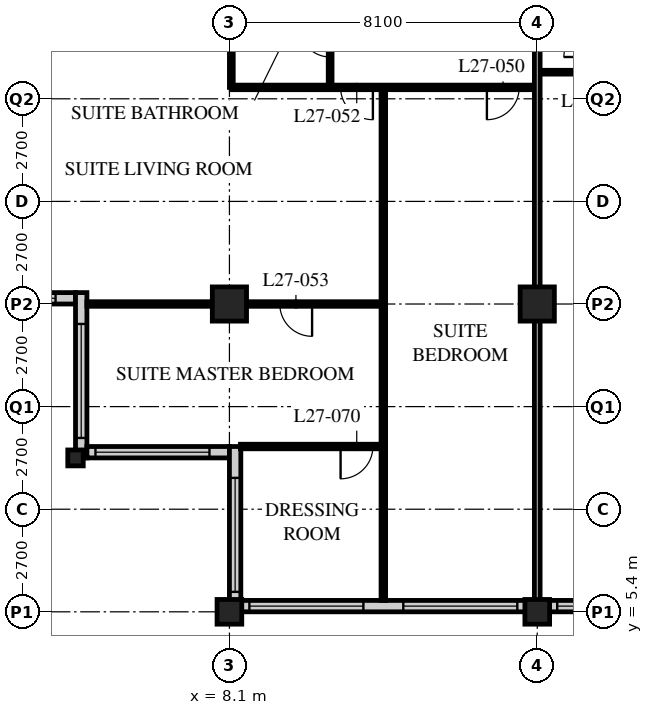
"""IFC4 building model, lengths in metres.
Left out: names, types, materials, properties, quantities, classifications, styles, units other than length and angle.
Written with IfcOpenShell. Run it as: python <this file> out.ifc"""

import sys

from ifc_helpers import new_model, si_unit, direction, frame, frame_2d, origin, origin_2d, place, context, subcontext, project, spatial, rectangle, hollow_rectangle, i_section, extrude, element, fill, save


model = new_model("IFC4")
c1 = context("Model", 3, precision=1e-05, world=origin(), true_north=direction((0.0, 1.0)))
c2 = subcontext(c1, "Body", "Model", "MODEL_VIEW")
j1 = project(units=[si_unit("LENGTHUNIT", "METRE"), si_unit("PLANEANGLEUNIT", "RADIAN")], contexts=[c1])
p1 = place(None, origin())
s1 = spatial("IfcSite", under=j1, at=p1, CompositionType="ELEMENT")
p2 = place(p1, origin())
s2 = spatial("IfcBuilding", under=s1, at=p2, CompositionType="ELEMENT")
p3 = place(p2, frame((0.0, 0.0, 110.2)))
s3 = spatial("IfcBuildingStorey", under=s2, at=p3, CompositionType="ELEMENT", Elevation=110.2)
p4 = place(p3, frame((4.05, 9.45, 0.0), z_axis=(0.0, 0.0, 1.0), x_axis=(1.0, 0.0, 0.0)))
e1 = element("IfcColumn", 1, at=p4, inside=s3, PredefinedType="COLUMN", context=c2, shape_type="SweptSolid", body=[
    extrude(i_section(OverallWidth=0.407, OverallDepth=0.419, WebThickness=0.031, FlangeThickness=0.049, FilletRadius=0.015, at=origin_2d()), origin(), (0.0, 0.0, 1.0), 3.4),
])
p5 = place(p3, frame((8.1, 5.4, 0.0), z_axis=(0.0, 0.0, 1.0), x_axis=(1.0, 0.0, 0.0)))
e2 = element("IfcColumn", 2, at=p5, inside=s3, PredefinedType="COLUMN", context=c2, shape_type="SweptSolid", body=[
    extrude(hollow_rectangle(XDim=0.65, YDim=0.65, WallThickness=0.055, at=origin_2d()), origin(), (0.0, 0.0, 1.0), 3.4),
])
p6 = place(p3, frame((8.1, 13.5, 0.0), z_axis=(0.0, 0.0, 1.0), x_axis=(1.0, 0.0, 0.0)))
e3 = element("IfcColumn", 3, at=p6, inside=s3, PredefinedType="COLUMN", context=c2, shape_type="SweptSolid", body=[
    extrude(hollow_rectangle(XDim=0.9, YDim=0.9, WallThickness=0.09, at=origin_2d()), origin(), (0.0, 0.0, 1.0), 3.4),
])
p7 = place(p3, frame((16.2, 5.4, 0.0), z_axis=(0.0, 0.0, 1.0), x_axis=(1.0, 0.0, 0.0)))
e4 = element("IfcColumn", 4, at=p7, inside=s3, PredefinedType="COLUMN", context=c2, shape_type="SweptSolid", body=[
    extrude(hollow_rectangle(XDim=0.65, YDim=0.65, WallThickness=0.055, at=origin_2d()), origin(), (0.0, 0.0, 1.0), 3.4),
])
p8 = place(p3, frame((16.2, 13.5, 0.0), z_axis=(0.0, 0.0, 1.0), x_axis=(1.0, 0.0, 0.0)))
e5 = element("IfcColumn", 5, at=p8, inside=s3, PredefinedType="COLUMN", context=c2, shape_type="SweptSolid", body=[
    extrude(hollow_rectangle(XDim=0.9, YDim=0.9, WallThickness=0.09, at=origin_2d()), origin(), (0.0, 0.0, 1.0), 3.4),
])
p9 = place(p3, frame((8.4, 5.55, 0.0), z_axis=(0.0, 0.0, 1.0), x_axis=(1.0, 0.0, 0.0)))
e6 = element("IfcWall", 6, at=p9, inside=s3, PredefinedType="SOLIDWALL", context=c2, shape_type="SweptSolid", body=[
    extrude(rectangle(XDim=40.2, YDim=0.3, at=frame_2d((20.1, 0.0))), origin(), (0.0, 0.0, 1.0), 3.19),
])
p10 = place(p9, frame((0.225, 0.0, 0.9)))
e7 = element("IfcOpeningElement", 7, at=p10, cuts=e6, PredefinedType="OPENING", context=c2, shape_type="SweptSolid", body=[
    extrude(rectangle(XDim=3.0, YDim=2.0, at=frame_2d((1.5, 1.0))), frame((0.0, 0.16, 0.0), z_axis=(0.0, -1.0, 0.0), x_axis=(1.0, 0.0, 0.0)), (0.0, 0.0, 1.0), 0.32),
])
p11 = place(p9, frame((4.275, 0.0, 0.9)))
e8 = element("IfcOpeningElement", 8, at=p11, cuts=e6, PredefinedType="OPENING", context=c2, shape_type="SweptSolid", body=[
    extrude(rectangle(XDim=3.0, YDim=2.0, at=frame_2d((1.5, 1.0))), frame((0.0, 0.16, 0.0), z_axis=(0.0, -1.0, 0.0), x_axis=(1.0, 0.0, 0.0)), (0.0, 0.0, 1.0), 0.32),
])
p12 = place(p9, frame((8.325, 0.0, 0.9)))
e9 = element("IfcOpeningElement", 9, at=p12, cuts=e6, PredefinedType="OPENING", context=c2, shape_type="SweptSolid", body=[
    extrude(rectangle(XDim=3.0, YDim=2.0, at=frame_2d((1.5, 1.0))), frame((0.0, 0.16, 0.0), z_axis=(0.0, -1.0, 0.0), x_axis=(1.0, 0.0, 0.0)), (0.0, 0.0, 1.0), 0.32),
])
p13 = place(p9, frame((12.375, 0.0, 0.9)))
e10 = element("IfcOpeningElement", 10, at=p13, cuts=e6, PredefinedType="OPENING", context=c2, shape_type="SweptSolid", body=[
    extrude(rectangle(XDim=3.0, YDim=2.0, at=frame_2d((1.5, 1.0))), frame((0.0, 0.16, 0.0), z_axis=(0.0, -1.0, 0.0), x_axis=(1.0, 0.0, 0.0)), (0.0, 0.0, 1.0), 0.32),
])
p14 = place(p9, frame((16.425, 0.0, 0.9)))
e11 = element("IfcOpeningElement", 11, at=p14, cuts=e6, PredefinedType="OPENING", context=c2, shape_type="SweptSolid", body=[
    extrude(rectangle(XDim=3.0, YDim=2.0, at=frame_2d((1.5, 1.0))), frame((0.0, 0.16, 0.0), z_axis=(0.0, -1.0, 0.0), x_axis=(1.0, 0.0, 0.0)), (0.0, 0.0, 1.0), 0.32),
])
p15 = place(p9, frame((20.475, 0.0, 0.9)))
e12 = element("IfcOpeningElement", 12, at=p15, cuts=e6, PredefinedType="OPENING", context=c2, shape_type="SweptSolid", body=[
    extrude(rectangle(XDim=3.0, YDim=2.0, at=frame_2d((1.5, 1.0))), frame((0.0, 0.16, 0.0), z_axis=(0.0, -1.0, 0.0), x_axis=(1.0, 0.0, 0.0)), (0.0, 0.0, 1.0), 0.32),
])
p16 = place(p9, frame((24.525, 0.0, 0.9)))
e13 = element("IfcOpeningElement", 13, at=p16, cuts=e6, PredefinedType="OPENING", context=c2, shape_type="SweptSolid", body=[
    extrude(rectangle(XDim=3.0, YDim=2.0, at=frame_2d((1.5, 1.0))), frame((0.0, 0.16, 0.0), z_axis=(0.0, -1.0, 0.0), x_axis=(1.0, 0.0, 0.0)), (0.0, 0.0, 1.0), 0.32),
])
p17 = place(p9, frame((28.575, 0.0, 0.9)))
e14 = element("IfcOpeningElement", 14, at=p17, cuts=e6, PredefinedType="OPENING", context=c2, shape_type="SweptSolid", body=[
    extrude(rectangle(XDim=3.0, YDim=2.0, at=frame_2d((1.5, 1.0))), frame((0.0, 0.16, 0.0), z_axis=(0.0, -1.0, 0.0), x_axis=(1.0, 0.0, 0.0)), (0.0, 0.0, 1.0), 0.32),
])
p18 = place(p9, frame((32.625, 0.0, 0.9)))
e15 = element("IfcOpeningElement", 15, at=p18, cuts=e6, PredefinedType="OPENING", context=c2, shape_type="SweptSolid", body=[
    extrude(rectangle(XDim=3.0, YDim=2.0, at=frame_2d((1.5, 1.0))), frame((0.0, 0.16, 0.0), z_axis=(0.0, -1.0, 0.0), x_axis=(1.0, 0.0, 0.0)), (0.0, 0.0, 1.0), 0.32),
])
p19 = place(p9, frame((36.675, 0.0, 0.9)))
e16 = element("IfcOpeningElement", 16, at=p19, cuts=e6, PredefinedType="OPENING", context=c2, shape_type="SweptSolid", body=[
    extrude(rectangle(XDim=3.0, YDim=2.0, at=frame_2d((1.5, 1.0))), frame((0.0, 0.16, 0.0), z_axis=(0.0, -1.0, 0.0), x_axis=(1.0, 0.0, 0.0)), (0.0, 0.0, 1.0), 0.32),
])
p20 = place(p3, frame((0.3, 13.65, 0.0), z_axis=(0.0, 0.0, 1.0), x_axis=(1.0, 0.0, 0.0)))
e17 = element("IfcWall", 17, at=p20, inside=s3, PredefinedType="SOLIDWALL", context=c2, shape_type="SweptSolid", body=[
    extrude(rectangle(XDim=3.75, YDim=0.3, at=frame_2d((1.875, 0.0))), origin(), (0.0, 0.0, 1.0), 3.19),
])
p21 = place(p20, frame((0.225, 0.0, 0.9)))
e18 = element("IfcOpeningElement", 18, at=p21, cuts=e17, PredefinedType="OPENING", context=c2, shape_type="SweptSolid", body=[
    extrude(rectangle(XDim=3.0, YDim=1.5, at=frame_2d((1.5, 0.75))), frame((0.0, 0.16, 0.0), z_axis=(0.0, -1.0, 0.0), x_axis=(1.0, 0.0, 0.0)), (0.0, 0.0, 1.0), 0.32),
])
p22 = place(p3, frame((4.2, 13.8, 0.0), z_axis=(0.0, 0.0, 1.0), x_axis=(0.0, -1.0, 0.0)))
e19 = element("IfcWall", 19, at=p22, inside=s3, PredefinedType="SOLIDWALL", context=c2, shape_type="SweptSolid", body=[
    extrude(rectangle(XDim=4.35, YDim=0.3, at=frame_2d((2.175, 0.0))), origin(), (0.0, 0.0, 1.0), 3.19),
])
p23 = place(p22, frame((0.825, 0.0, 0.9)))
e20 = element("IfcOpeningElement", 20, at=p23, cuts=e19, PredefinedType="OPENING", context=c2, shape_type="SweptSolid", body=[
    extrude(rectangle(XDim=3.0, YDim=1.5, at=frame_2d((1.5, 0.75))), frame((0.0, 0.16, 0.0), z_axis=(0.0, -1.0, 0.0), x_axis=(1.0, 0.0, 0.0)), (0.0, 0.0, 1.0), 0.32),
])
p24 = place(p3, frame((4.35, 9.6, 0.0), z_axis=(0.0, 0.0, 1.0), x_axis=(1.0, 0.0, 0.0)))
e21 = element("IfcWall", 21, at=p24, inside=s3, PredefinedType="SOLIDWALL", context=c2, shape_type="SweptSolid", body=[
    extrude(rectangle(XDim=3.75, YDim=0.3, at=frame_2d((1.875, 0.0))), origin(), (0.0, 0.0, 1.0), 3.19),
])
p25 = place(p24, frame((0.225, 0.0, 0.9)))
e22 = element("IfcOpeningElement", 22, at=p25, cuts=e21, PredefinedType="OPENING", context=c2, shape_type="SweptSolid", body=[
    extrude(rectangle(XDim=3.0, YDim=1.5, at=frame_2d((1.5, 0.75))), frame((0.0, 0.16, 0.0), z_axis=(0.0, -1.0, 0.0), x_axis=(1.0, 0.0, 0.0)), (0.0, 0.0, 1.0), 0.32),
])
p26 = place(p3, frame((8.25, 9.75, 0.0), z_axis=(0.0, 0.0, 1.0), x_axis=(0.0, -1.0, 0.0)))
e23 = element("IfcWall", 23, at=p26, inside=s3, PredefinedType="SOLIDWALL", context=c2, shape_type="SweptSolid", body=[
    extrude(rectangle(XDim=4.35, YDim=0.3, at=frame_2d((2.175, 0.0))), origin(), (0.0, 0.0, 1.0), 3.19),
])
p27 = place(p26, frame((0.825, 0.0, 0.9)))
e24 = element("IfcOpeningElement", 24, at=p27, cuts=e23, PredefinedType="OPENING", context=c2, shape_type="SweptSolid", body=[
    extrude(rectangle(XDim=3.0, YDim=1.5, at=frame_2d((1.5, 0.75))), frame((0.0, 0.16, 0.0), z_axis=(0.0, -1.0, 0.0), x_axis=(1.0, 0.0, 0.0)), (0.0, 0.0, 1.0), 0.32),
])
p28 = place(p3, frame((16.2, 19.6, 0.0), z_axis=(0.0, 0.0, 1.0), x_axis=(1.0, 0.0, 0.0)))
e25 = element("IfcWall", 25, at=p28, inside=s3, PredefinedType="PARTITIONING", context=c2, shape_type="SweptSolid", body=[
    extrude(rectangle(XDim=1.5, YDim=0.1, at=frame_2d((0.75, 0.0))), origin(), (0.0, 0.0, 1.0), 3.19),
])
p29 = place(p3, frame((10.75, 21.6, 0.0), z_axis=(0.0, 0.0, 1.0), x_axis=(0.0, -1.0, 0.0)))
e26 = element("IfcWall", 26, at=p29, inside=s3, PredefinedType="PARTITIONING", context=c2, shape_type="SweptSolid", body=[
    extrude(rectangle(XDim=2.4, YDim=0.1, at=frame_2d((1.2, 0.0))), origin(), (0.0, 0.0, 1.0), 3.19),
])
p30 = place(p29, frame((0.8, 0.0, 0.0)))
e27 = element("IfcOpeningElement", 27, at=p30, cuts=e26, PredefinedType="OPENING", context=c2, shape_type="SweptSolid", body=[
    extrude(rectangle(XDim=0.8, YDim=2.1, at=frame_2d((0.4, 1.05))), frame((0.0, 0.06, 0.0), z_axis=(0.0, -1.0, 0.0), x_axis=(1.0, 0.0, 0.0)), (0.0, 0.0, 1.0), 0.12),
])
p31 = place(p3, frame((8.15, 21.6, 0.0), z_axis=(0.0, 0.0, 1.0), x_axis=(0.0, -1.0, 0.0)))
e28 = element("IfcWall", 28, at=p31, inside=s3, PredefinedType="PARTITIONING", context=c2, shape_type="SweptSolid", body=[
    extrude(rectangle(XDim=2.4, YDim=0.1, at=frame_2d((1.2, 0.0))), origin(), (0.0, 0.0, 1.0), 2.578),
])
p32 = place(p3, frame((8.15, 19.2, 0.0), z_axis=(0.0, 0.0, 1.0), x_axis=(1.0, 0.0, 0.0)))
e29 = element("IfcWall", 29, at=p32, inside=s3, PredefinedType="PARTITIONING", context=c2, shape_type="SweptSolid", body=[
    extrude(rectangle(XDim=8.05, YDim=0.12, at=frame_2d((4.025, 0.0))), origin(), (0.0, 0.0, 1.0), 3.19),
])
p33 = place(p32, frame((6.725, 0.0, 0.0)))
e30 = element("IfcOpeningElement", 30, at=p33, cuts=e29, PredefinedType="OPENING", context=c2, shape_type="SweptSolid", body=[
    extrude(rectangle(XDim=0.85, YDim=2.1, at=frame_2d((0.425, 1.05))), frame((0.0, 0.07, 0.0), z_axis=(0.0, -1.0, 0.0), x_axis=(1.0, 0.0, 0.0)), (0.0, 0.0, 1.0), 0.14),
])
p34 = place(p32, frame((2.875, 0.0, 0.0)))
e31 = element("IfcOpeningElement", 31, at=p34, cuts=e29, PredefinedType="OPENING", context=c2, shape_type="SweptSolid", body=[
    extrude(rectangle(XDim=0.85, YDim=2.1, at=frame_2d((0.425, 1.05))), frame((0.0, 0.07, 0.0), z_axis=(0.0, -1.0, 0.0), x_axis=(1.0, 0.0, 0.0)), (0.0, 0.0, 1.0), 0.14),
])
p35 = place(p3, frame((12.15, 19.2, 0.0), z_axis=(0.0, 0.0, 1.0), x_axis=(0.0, -1.0, 0.0)))
e32 = element("IfcWall", 32, at=p35, inside=s3, PredefinedType="PARTITIONING", context=c2, shape_type="SweptSolid", body=[
    extrude(rectangle(XDim=13.5, YDim=0.12, at=frame_2d((6.75, 0.0))), origin(), (0.0, 0.0, 1.0), 3.19),
])
p36 = place(p3, frame((12.15, 13.5, 0.0), z_axis=(0.0, 0.0, 1.0), x_axis=(-1.0, 0.0, 0.0)))
e33 = element("IfcWall", 33, at=p36, inside=s3, PredefinedType="PARTITIONING", context=c2, shape_type="SweptSolid", body=[
    extrude(rectangle(XDim=7.8, YDim=0.12, at=frame_2d((3.9, 0.0))), origin(), (0.0, 0.0, 1.0), 2.578),
])
p37 = place(p36, frame((1.875, 0.0, 0.0)))
e34 = element("IfcOpeningElement", 34, at=p37, cuts=e33, PredefinedType="OPENING", context=c2, shape_type="SweptSolid", body=[
    extrude(rectangle(XDim=0.85, YDim=2.1, at=frame_2d((0.425, 1.05))), frame((0.0, 0.07, 0.0), z_axis=(0.0, -1.0, 0.0), x_axis=(1.0, 0.0, 0.0)), (0.0, 0.0, 1.0), 0.14),
])
p38 = place(p3, frame((16.2, 21.6, 0.0), z_axis=(0.0, 0.0, 1.0), x_axis=(0.0, -1.0, 0.0)))
e35 = element("IfcWall", 35, at=p38, inside=s3, PredefinedType="PARTITIONING", context=c2, shape_type="SweptSolid", body=[
    extrude(rectangle(XDim=15.9, YDim=0.15, at=frame_2d((7.95, 0.0))), origin(), (0.0, 0.0, 1.0), 2.578),
])
p39 = place(p3, frame((8.39, 9.75, 0.0), z_axis=(0.0, 0.0, 1.0), x_axis=(1.0, 0.0, 0.0)))
e36 = element("IfcWall", 36, at=p39, inside=s3, PredefinedType="PARTITIONING", context=c2, shape_type="SweptSolid", body=[
    extrude(rectangle(XDim=3.76, YDim=0.12, at=frame_2d((1.88, 0.0))), origin(), (0.0, 0.0, 1.0), 3.19),
])
p40 = place(p39, frame((2.635, 0.0, 0.0)))
e37 = element("IfcOpeningElement", 37, at=p40, cuts=e36, PredefinedType="OPENING", context=c2, shape_type="SweptSolid", body=[
    extrude(rectangle(XDim=0.85, YDim=2.1, at=frame_2d((0.425, 1.05))), frame((0.0, 0.07, 0.0), z_axis=(0.0, -1.0, 0.0), x_axis=(1.0, 0.0, 0.0)), (0.0, 0.0, 1.0), 0.14),
])
p41 = place(p10, origin())
e38 = element("IfcWindow", 38, at=p41, inside=s3, PartitioningType="SINGLE_PANEL", PredefinedType="WINDOW", context=c2, shape_type="SweptSolid", body=[
    extrude(rectangle(XDim=3.0, YDim=2.0, at=frame_2d((1.5, 1.0))), frame((0.0, 0.03, 0.0), z_axis=(0.0, -1.0, 0.0), x_axis=(1.0, 0.0, 0.0)), (0.0, 0.0, 1.0), 0.06),
])
fill(e7, e38)
p42 = place(p11, origin())
e39 = element("IfcWindow", 39, at=p42, inside=s3, PartitioningType="SINGLE_PANEL", PredefinedType="WINDOW", context=c2, shape_type="SweptSolid", body=[
    extrude(rectangle(XDim=3.0, YDim=2.0, at=frame_2d((1.5, 1.0))), frame((0.0, 0.03, 0.0), z_axis=(0.0, -1.0, 0.0), x_axis=(1.0, 0.0, 0.0)), (0.0, 0.0, 1.0), 0.06),
])
fill(e8, e39)
p43 = place(p12, origin())
e40 = element("IfcWindow", 40, at=p43, inside=s3, PartitioningType="SINGLE_PANEL", PredefinedType="WINDOW", context=c2, shape_type="SweptSolid", body=[
    extrude(rectangle(XDim=3.0, YDim=2.0, at=frame_2d((1.5, 1.0))), frame((0.0, 0.03, 0.0), z_axis=(0.0, -1.0, 0.0), x_axis=(1.0, 0.0, 0.0)), (0.0, 0.0, 1.0), 0.06),
])
fill(e9, e40)
p44 = place(p21, origin())
e41 = element("IfcWindow", 41, at=p44, inside=s3, PartitioningType="SINGLE_PANEL", PredefinedType="WINDOW", context=c2, shape_type="SweptSolid", body=[
    extrude(rectangle(XDim=3.0, YDim=1.5, at=frame_2d((1.5, 0.75))), frame((0.0, 0.03, 0.0), z_axis=(0.0, -1.0, 0.0), x_axis=(1.0, 0.0, 0.0)), (0.0, 0.0, 1.0), 0.06),
])
fill(e18, e41)
p45 = place(p23, origin())
e42 = element("IfcWindow", 42, at=p45, inside=s3, PartitioningType="SINGLE_PANEL", PredefinedType="WINDOW", context=c2, shape_type="SweptSolid", body=[
    extrude(rectangle(XDim=3.0, YDim=1.5, at=frame_2d((1.5, 0.75))), frame((0.0, 0.03, 0.0), z_axis=(0.0, -1.0, 0.0), x_axis=(1.0, 0.0, 0.0)), (0.0, 0.0, 1.0), 0.06),
])
fill(e20, e42)
p46 = place(p25, origin())
e43 = element("IfcWindow", 43, at=p46, inside=s3, PartitioningType="SINGLE_PANEL", PredefinedType="WINDOW", context=c2, shape_type="SweptSolid", body=[
    extrude(rectangle(XDim=3.0, YDim=1.5, at=frame_2d((1.5, 0.75))), frame((0.0, 0.03, 0.0), z_axis=(0.0, -1.0, 0.0), x_axis=(1.0, 0.0, 0.0)), (0.0, 0.0, 1.0), 0.06),
])
fill(e22, e43)
p47 = place(p27, origin())
e44 = element("IfcWindow", 44, at=p47, inside=s3, PartitioningType="SINGLE_PANEL", PredefinedType="WINDOW", context=c2, shape_type="SweptSolid", body=[
    extrude(rectangle(XDim=3.0, YDim=1.5, at=frame_2d((1.5, 0.75))), frame((0.0, 0.03, 0.0), z_axis=(0.0, -1.0, 0.0), x_axis=(1.0, 0.0, 0.0)), (0.0, 0.0, 1.0), 0.06),
])
fill(e24, e44)
p48 = place(p33, origin())
e45 = element("IfcDoor", 45, at=p48, inside=s3, OperationType="SINGLE_SWING_RIGHT", PredefinedType="DOOR", context=c2, shape_type="SweptSolid", body=[
    extrude(rectangle(XDim=0.85, YDim=2.1, at=frame_2d((0.425, 1.05))), frame((0.0, 0.025, 0.0), z_axis=(0.0, -1.0, 0.0), x_axis=(1.0, 0.0, 0.0)), (0.0, 0.0, 1.0), 0.05),
])
fill(e30, e45)
p49 = place(p30, origin())
e46 = element("IfcDoor", 46, at=p49, inside=s3, OperationType="SINGLE_SWING_RIGHT", PredefinedType="DOOR", context=c2, shape_type="SweptSolid", body=[
    extrude(rectangle(XDim=0.8, YDim=2.1, at=frame_2d((0.4, 1.05))), frame((0.0, 0.025, 0.0), z_axis=(0.0, -1.0, 0.0), x_axis=(1.0, 0.0, 0.0)), (0.0, 0.0, 1.0), 0.05),
])
fill(e27, e46)
p50 = place(p34, origin())
e47 = element("IfcDoor", 47, at=p50, inside=s3, OperationType="SINGLE_SWING_LEFT", PredefinedType="DOOR", context=c2, shape_type="SweptSolid", body=[
    extrude(rectangle(XDim=0.85, YDim=2.1, at=frame_2d((0.425, 1.05))), frame((0.0, 0.025, 0.0), z_axis=(0.0, -1.0, 0.0), x_axis=(1.0, 0.0, 0.0)), (0.0, 0.0, 1.0), 0.05),
])
fill(e31, e47)
p51 = place(p37, origin())
e48 = element("IfcDoor", 48, at=p51, inside=s3, OperationType="SINGLE_SWING_LEFT", PredefinedType="DOOR", context=c2, shape_type="SweptSolid", body=[
    extrude(rectangle(XDim=0.85, YDim=2.1, at=frame_2d((0.425, 1.05))), frame((0.0, 0.025, 0.0), z_axis=(0.0, -1.0, 0.0), x_axis=(1.0, 0.0, 0.0)), (0.0, 0.0, 1.0), 0.05),
])
fill(e34, e48)
p52 = place(p40, origin())
e49 = element("IfcDoor", 49, at=p52, inside=s3, OperationType="SINGLE_SWING_RIGHT", PredefinedType="DOOR", context=c2, shape_type="SweptSolid", body=[
    extrude(rectangle(XDim=0.85, YDim=2.1, at=frame_2d((0.425, 1.05))), frame((0.0, 0.025, 0.0), z_axis=(0.0, -1.0, 0.0), x_axis=(1.0, 0.0, 0.0)), (0.0, 0.0, 1.0), 0.05),
])
fill(e37, e49)
save(model, sys.argv[1])
